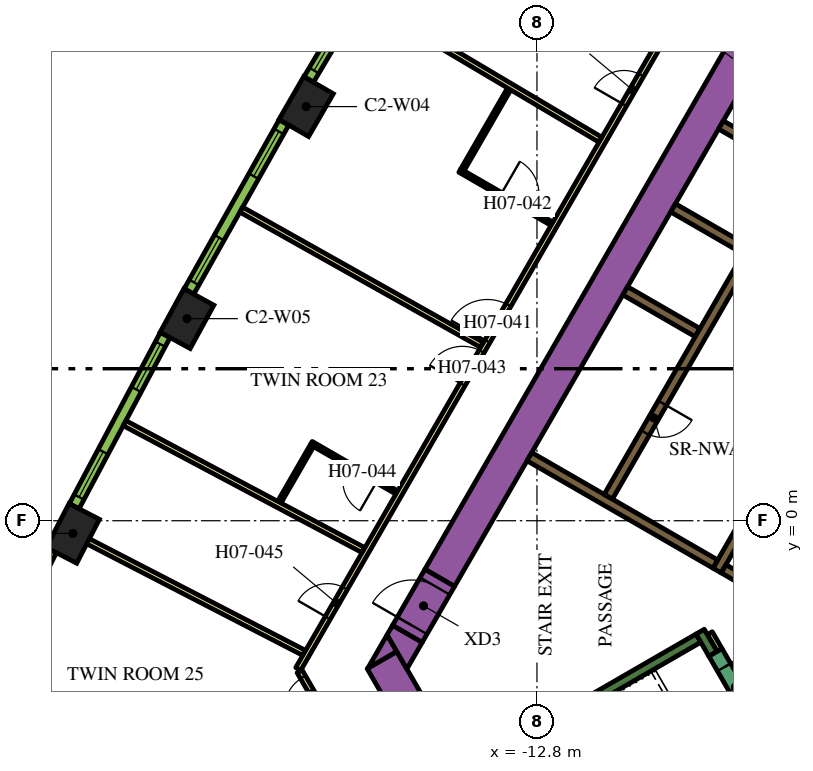
"""IFC4 building model, lengths in metres.
Left out: names, types, materials, properties, quantities, classifications, styles, units other than length and angle.
Written with IfcOpenShell. Run it as: python <this file> out.ifc"""

import sys

from ifc_helpers import new_model, si_unit, direction, frame, frame_2d, origin, origin_2d, place, context, subcontext, project, spatial, polyline, rectangle, outline, extrude, element, fill, save


model = new_model("IFC4")
c1 = context("Model", 3, precision=1e-05, world=origin(), true_north=direction((0.0, 1.0)))
c2 = subcontext(c1, "Body", "Model", "MODEL_VIEW")
j1 = project(units=[si_unit("LENGTHUNIT", "METRE"), si_unit("PLANEANGLEUNIT", "RADIAN")], contexts=[c1])
p1 = place(None, origin())
s1 = spatial("IfcSite", under=j1, at=p1, CompositionType="ELEMENT")
p2 = place(p1, origin())
s2 = spatial("IfcBuilding", under=s1, at=p2, CompositionType="ELEMENT")
p3 = place(p2, frame((0.0, 0.0, 95.4)))
s3 = spatial("IfcBuildingStorey", under=s2, at=p3, CompositionType="ELEMENT", Elevation=95.4)
for number, where, z_axis, x_axis in (
    (1, (-18.874, 10.897, 0.0), (0.0, 0.0, 1.0), (-0.5, -0.866, 0.0)),
    (2, (-22.009, 5.317, 0.0), (0.0, 0.0, 1.0), (-0.48, -0.877, 0.0)),
    (3, (-25.012, -0.334, 0.0), (0.0, 0.0, 1.0), (-0.459, -0.888, 0.0)),
):
    element("IfcColumn", number, at=place(p3, frame(where, z_axis=z_axis, x_axis=x_axis)), inside=s3, PredefinedType="COLUMN", context=c2, shape_type="SweptSolid", body=[
        extrude(rectangle(XDim=1.3, YDim=0.9, at=origin_2d()), origin(), (0.0, 0.0, 1.0), 3.9),
    ])
p4 = place(p3, frame((-15.36, -1.503, 0.0), z_axis=(0.0, 0.0, 1.0), x_axis=(0.50000389221, 0.866023156604, 0.0)))
e4 = element("IfcWall", 4, at=p4, inside=s3, PredefinedType="SOLIDWALL", context=c2, shape_type="SweptSolid", body=[
    extrude(rectangle(XDim=21.0, YDim=0.9, at=frame_2d((10.5, 0.0))), origin(), (0.0, 0.0, 1.0), 3.9),
])
p5 = place(p3, frame((-12.134, -11.883, 0.0), z_axis=(0.0, 0.0, 1.0), x_axis=(-0.500005339912, 0.866022320763, 0.0)))
e5 = element("IfcWall", 5, at=p5, inside=s3, PredefinedType="SOLIDWALL", context=c2, shape_type="SweptSolid", body=[
    extrude(rectangle(XDim=9.488, YDim=0.9, at=frame_2d((4.744, 0.0))), origin(), (0.0, 0.0, 1.0), 3.9),
])
p6 = place(p3, origin())
e6 = element("IfcWall", 6, at=p6, inside=s3, PredefinedType="SOLIDWALL", context=c2, shape_type="SweptSolid", body=[
    extrude(outline(polyline([(-16.489, -3.44), (-17.251, -3.88), (-16.743, -3.0), (-16.489, -3.44)])), origin(), (0.0, 0.0, 1.0), 3.9),
])
e7 = element("IfcWall", 7, at=p6, inside=s3, PredefinedType="SOLIDWALL", context=c2, shape_type="SweptSolid", body=[
    extrude(outline(polyline([(-15.82, -3.201), (-16.223, -3.9), (-16.743, -3.0), (-16.599, -2.751), (-15.82, -3.201)])), origin(), (0.0, 0.0, 1.0), 3.9),
])
p7 = place(p3, frame((-14.44, -6.49, 0.0), z_axis=(0.0, 0.0, 1.0), x_axis=(0.866022966069, 0.500004222222, 0.0)))
e8 = element("IfcWall", 8, at=p7, inside=s3, PredefinedType="SOLIDWALL", context=c2, shape_type="SweptSolid", body=[
    extrude(rectangle(XDim=6.8, YDim=0.25, at=frame_2d((3.4, 0.0))), origin(), (0.0, 0.0, 1.0), 3.9),
])
p8 = place(p3, frame((-8.168, -3.503, 0.0), z_axis=(0.0, 0.0, 1.0), x_axis=(-0.499952099219, 0.866053057547, 0.0)))
e9 = element("IfcWall", 9, at=p8, inside=s3, PredefinedType="SOLIDWALL", context=c2, shape_type="SweptSolid", body=[
    extrude(rectangle(XDim=0.675, YDim=0.25, at=frame_2d((0.337, 0.0))), origin(), (0.0, 0.0, 1.0), 3.9),
])
p9 = place(p3, frame((-8.06, -1.311, 0.0), z_axis=(0.0, 0.0, 1.0), x_axis=(0.50000273126, 0.866023826885, 0.0)))
e10 = element("IfcWall", 10, at=p9, inside=s3, PredefinedType="SOLIDWALL", context=c2, shape_type="SweptSolid", body=[
    extrude(rectangle(XDim=10.33, YDim=0.25, at=frame_2d((5.165, 0.0))), origin(), (0.0, 0.0, 1.0), 3.9),
])
e11 = element("IfcWall", 11, at=p6, inside=s3, PredefinedType="SOLIDWALL", context=c2, shape_type="SweptSolid", body=[
    extrude(outline(polyline([(-5.922, -2.257), (-5.922, -2.257), (-5.705, -2.382), (-5.83, -2.598), (-6.483, -2.221), (-6.591, -2.033), (-6.591, -2.033), (-6.7, -2.096), (-7.952, -1.373), (-7.827, -1.156), (-5.922, -2.257)])), origin(), (0.0, 0.0, 1.0), 3.9),
])
p10 = place(p3, frame((-8.106, -1.14, 0.0), z_axis=(0.0, 0.0, 1.0), x_axis=(-0.866000643155, 0.500042884217, 0.0)))
e12 = element("IfcWall", 12, at=p10, inside=s3, PredefinedType="SOLIDWALL", context=c2, shape_type="SweptSolid", body=[
    extrude(rectangle(XDim=5.65, YDim=0.25, at=frame_2d((2.825, 0.0))), origin(), (0.0, 0.0, 1.0), 3.9),
])
for number, where, z_axis, x_axis in (
    (13, (-8.574, 4.95, 0.0), (0.0, 0.0, 1.0), (-0.866, 0.5, 0.0)),
    (14, (-7.314, 7.132, 0.0), (0.0, 0.0, 1.0), (-0.866, 0.5, 0.0)),
):
    element("IfcWall", number, at=place(p3, frame(where, z_axis=z_axis, x_axis=x_axis)), inside=s3, PredefinedType="SOLIDWALL", context=c2, shape_type="SweptSolid", body=[
        extrude(rectangle(XDim=2.2, YDim=0.25, at=frame_2d((1.1, 0.0))), origin(), (0.0, 0.0, 1.0), 3.9),
    ])
p11 = place(p3, frame((-7.959, 10.415, 0.0), z_axis=(0.0, 0.0, 1.0), x_axis=(0.866020958405, -0.500007699544, 0.0)))
e15 = element("IfcWall", 15, at=p11, inside=s3, PredefinedType="SOLIDWALL", context=c2, shape_type="SweptSolid", body=[
    extrude(rectangle(XDim=4.1, YDim=0.25, at=frame_2d((2.05, 0.0))), origin(), (0.0, 0.0, 1.0), 3.9),
])
p12 = place(p3, frame((-8.252, -2.958, 0.0), z_axis=(0.0, 0.0, 1.0), x_axis=(0.500174715838, -0.865924508047, 0.0)))
e16 = element("IfcWall", 16, at=p12, inside=s3, PredefinedType="PARTITIONING", context=c2, shape_type="SweptSolid", body=[
    extrude(rectangle(XDim=0.514, YDim=0.15, at=frame_2d((0.257, 0.0))), origin(), (0.0, 0.0, 1.0), 2.75),
])
p13 = place(p3, frame((-6.008, 9.144, 0.0), z_axis=(0.0, 0.0, 1.0), x_axis=(-0.500006956611, -0.866021387346, 0.0)))
e17 = element("IfcWall", 17, at=p13, inside=s3, PredefinedType="SOLIDWALL", context=c2, shape_type="SweptSolid", body=[
    extrude(rectangle(XDim=9.83, YDim=0.25, at=frame_2d((4.915, 0.0))), origin(), (0.0, 0.0, 1.0), 3.9),
])
p14 = place(p13, frame((6.985, 0.0, 0.0)))
e18 = element("IfcOpeningElement", 18, at=p14, cuts=e17, PredefinedType="OPENING", context=c2, shape_type="SweptSolid", body=[
    extrude(rectangle(XDim=0.9, YDim=2.1, at=frame_2d((0.45, 1.05))), frame((0.0, 0.135, 0.0), z_axis=(0.0, -1.0, 0.0), x_axis=(1.0, 0.0, 0.0)), (0.0, 0.0, 1.0), 0.27),
])
p15 = place(p3, frame((-8.103, -3.466, 0.0), z_axis=(0.0, 0.0, 1.0), x_axis=(0.500078061341, -0.865980330357, 0.0)))
e19 = element("IfcWall", 19, at=p15, inside=s3, PredefinedType="SOLIDWALL", context=c2, shape_type="SweptSolid", body=[
    extrude(rectangle(XDim=2.1, YDim=0.4, at=frame_2d((1.05, 0.0))), origin(), (0.0, 0.0, 1.0), 3.9),
])
p16 = place(p15, frame((0.45, 0.0, 0.0)))
e20 = element("IfcOpeningElement", 20, at=p16, cuts=e19, PredefinedType="OPENING", context=c2, shape_type="SweptSolid", body=[
    extrude(rectangle(XDim=1.2, YDim=2.1, at=frame_2d((0.6, 1.05))), frame((0.0, 0.21, 0.0), z_axis=(0.0, -1.0, 0.0), x_axis=(1.0, 0.0, 0.0)), (0.0, 0.0, 1.0), 0.42),
])
p17 = place(p3, frame((-16.209, -2.976, 0.0), z_axis=(0.0, 0.0, 1.0), x_axis=(0.499954529098, 0.86605165483, 0.0)))
e21 = element("IfcWall", 21, at=p17, inside=s3, PredefinedType="SOLIDWALL", context=c2, shape_type="SweptSolid", body=[
    extrude(rectangle(XDim=1.7, YDim=0.9, at=frame_2d((0.85, 0.0))), origin(), (0.0, 0.0, 1.0), 3.9),
])
p18 = place(p17, frame((0.25, 0.0, 0.0)))
e22 = element("IfcOpeningElement", 22, at=p18, cuts=e21, PredefinedType="OPENING", context=c2, shape_type="SweptSolid", body=[
    extrude(rectangle(XDim=1.2, YDim=2.1, at=frame_2d((0.6, 1.05))), frame((0.0, 0.46, 0.0), z_axis=(0.0, -1.0, 0.0), x_axis=(1.0, 0.0, 0.0)), (0.0, 0.0, 1.0), 0.92),
])
p19 = place(p3, frame((-19.081, -3.9, 0.0), z_axis=(0.0, 0.0, 1.0), x_axis=(0.499998313975, 0.866026377209, 0.0)))
e23 = element("IfcWall", 23, at=p19, inside=s3, PredefinedType="PARTITIONING", context=c2, shape_type="SweptSolid", body=[
    extrude(rectangle(XDim=25.766, YDim=0.15, at=frame_2d((12.883, 0.0))), origin(), (0.0, 0.0, 1.0), 2.75),
])
p20 = place(p19, frame((19.306, 0.0, 0.0)))
e24 = element("IfcOpeningElement", 24, at=p20, cuts=e23, PredefinedType="OPENING", context=c2, shape_type="SweptSolid", body=[
    extrude(rectangle(XDim=1.0, YDim=2.1, at=frame_2d((0.5, 1.05))), frame((0.0, 0.085, 0.0), z_axis=(0.0, -1.0, 0.0), x_axis=(1.0, 0.0, 0.0)), (0.0, 0.0, 1.0), 0.17),
])
p21 = place(p19, frame((17.144, 0.0, 0.0)))
e25 = element("IfcOpeningElement", 25, at=p21, cuts=e23, PredefinedType="OPENING", context=c2, shape_type="SweptSolid", body=[
    extrude(rectangle(XDim=0.9, YDim=2.1, at=frame_2d((0.45, 1.05))), frame((0.0, 0.085, 0.0), z_axis=(0.0, -1.0, 0.0), x_axis=(1.0, 0.0, 0.0)), (0.0, 0.0, 1.0), 0.17),
])
p22 = place(p19, frame((9.955, 0.0, 0.0)))
e26 = element("IfcOpeningElement", 26, at=p22, cuts=e23, PredefinedType="OPENING", context=c2, shape_type="SweptSolid", body=[
    extrude(rectangle(XDim=1.1, YDim=2.1, at=frame_2d((0.55, 1.05))), frame((0.0, 0.085, 0.0), z_axis=(0.0, -1.0, 0.0), x_axis=(1.0, 0.0, 0.0)), (0.0, 0.0, 1.0), 0.17),
])
p23 = place(p19, frame((8.648, 0.0, 0.0)))
e27 = element("IfcOpeningElement", 27, at=p23, cuts=e23, PredefinedType="OPENING", context=c2, shape_type="SweptSolid", body=[
    extrude(rectangle(XDim=1.0, YDim=2.1, at=frame_2d((0.5, 1.05))), frame((0.0, 0.085, 0.0), z_axis=(0.0, -1.0, 0.0), x_axis=(1.0, 0.0, 0.0)), (0.0, 0.0, 1.0), 0.17),
])
p24 = place(p19, frame((1.553, 0.0, 0.0)))
e28 = element("IfcOpeningElement", 28, at=p24, cuts=e23, PredefinedType="OPENING", context=c2, shape_type="SweptSolid", body=[
    extrude(rectangle(XDim=0.9, YDim=2.1, at=frame_2d((0.45, 1.05))), frame((0.0, 0.085, 0.0), z_axis=(0.0, -1.0, 0.0), x_axis=(1.0, 0.0, 0.0)), (0.0, 0.0, 1.0), 0.17),
])
p25 = place(p3, frame((-16.412, -8.523, 0.0), z_axis=(0.0, 0.0, 1.0), x_axis=(-0.500001929737, 0.866024289647, 0.0)))
e29 = element("IfcWall", 29, at=p25, inside=s3, PredefinedType="PARTITIONING", context=c2, shape_type="SweptSolid", body=[
    extrude(rectangle(XDim=5.268, YDim=0.15, at=frame_2d((2.634, 0.0))), origin(), (0.0, 0.0, 1.0), 2.75),
])
p26 = place(p25, frame((4.088, 0.0, 0.0)))
e30 = element("IfcOpeningElement", 30, at=p26, cuts=e29, PredefinedType="OPENING", context=c2, shape_type="SweptSolid", body=[
    extrude(rectangle(XDim=1.0, YDim=2.1, at=frame_2d((0.5, 1.05))), frame((0.0, 0.085, 0.0), z_axis=(0.0, -1.0, 0.0), x_axis=(1.0, 0.0, 0.0)), (0.0, 0.0, 1.0), 0.17),
])
p27 = place(p3, frame((-24.613, -0.541, 0.0), z_axis=(0.0, 0.0, 1.0), x_axis=(0.888459912519, -0.458954228487, 0.0)))
e31 = element("IfcWall", 31, at=p27, inside=s3, PredefinedType="PARTITIONING", context=c2, shape_type="SweptSolid", body=[
    extrude(rectangle(XDim=6.392, YDim=0.15, at=frame_2d((3.196, 0.0))), origin(), (0.0, 0.0, 1.0), 2.75),
])
p28 = place(p3, frame((-23.652, 2.567, 0.0), z_axis=(0.0, 0.0, 1.0), x_axis=(0.883019237957, -0.469336793144, 0.0)))
e32 = element("IfcWall", 32, at=p28, inside=s3, PredefinedType="PARTITIONING", context=c2, shape_type="SweptSolid", body=[
    extrude(rectangle(XDim=7.111, YDim=0.15, at=frame_2d((3.555, 0.0))), origin(), (0.0, 0.0, 1.0), 2.75),
])
for number, where, z_axis, x_axis in (
    (33, (-20.581, 8.185, 0.0), (0.0, 0.0, 1.0), (0.872, -0.49, 0.0)),
    (34, (-17.379, 13.731, 0.0), (0.0, 0.0, 1.0), (0.86, -0.51, 0.0)),
):
    element("IfcWall", number, at=place(p3, frame(where, z_axis=z_axis, x_axis=x_axis)), inside=s3, PredefinedType="PARTITIONING", context=c2, shape_type="SweptSolid", body=[
        extrude(rectangle(XDim=7.257, YDim=0.15, at=frame_2d((3.628, 0.0))), origin(), (0.0, 0.0, 1.0), 2.75),
    ])
p29 = place(p3, frame((-14.83, 9.213, 0.0), z_axis=(0.0, 0.0, 1.0), x_axis=(0.866034573852, -0.49998411664, 0.0)))
e35 = element("IfcWall", 35, at=p29, inside=s3, PredefinedType="PARTITIONING", context=c2, shape_type="SweptSolid", body=[
    extrude(rectangle(XDim=2.8, YDim=0.1, at=frame_2d((1.4, 0.0))), origin(), (0.0, 0.0, 1.0), 2.75),
])
p30 = place(p29, frame((1.25, 0.0, 0.0)))
e36 = element("IfcOpeningElement", 36, at=p30, cuts=e35, PredefinedType="OPENING", context=c2, shape_type="SweptSolid", body=[
    extrude(rectangle(XDim=1.0, YDim=2.1, at=frame_2d((0.5, 1.05))), frame((0.0, 0.06, 0.0), z_axis=(0.0, -1.0, 0.0), x_axis=(1.0, 0.0, 0.0)), (0.0, 0.0, 1.0), 0.12),
])
p31 = place(p3, frame((-14.762, 9.231, 0.0), z_axis=(0.0, 0.0, 1.0), x_axis=(0.500003092839, 0.866023618125, 0.0)))
e37 = element("IfcWall", 37, at=p31, inside=s3, PredefinedType="PARTITIONING", context=c2, shape_type="SweptSolid", body=[
    extrude(rectangle(XDim=2.46, YDim=0.1, at=frame_2d((1.23, 0.0))), origin(), (0.0, 0.0, 1.0), 2.75),
])
p32 = place(p3, frame((-16.487, 0.743, 0.0), z_axis=(0.0, 0.0, 1.0), x_axis=(-0.866021400173, 0.500006934395, 0.0)))
e38 = element("IfcWall", 38, at=p32, inside=s3, PredefinedType="PARTITIONING", context=c2, shape_type="SweptSolid", body=[
    extrude(rectangle(XDim=2.6, YDim=0.1, at=frame_2d((1.3, 0.0))), origin(), (0.0, 0.0, 1.0), 2.75),
])
p33 = place(p32, frame((0.6, 0.0, 0.0)))
e39 = element("IfcOpeningElement", 39, at=p33, cuts=e38, PredefinedType="OPENING", context=c2, shape_type="SweptSolid", body=[
    extrude(rectangle(XDim=0.9, YDim=2.1, at=frame_2d((0.45, 1.05))), frame((0.0, 0.06, 0.0), z_axis=(0.0, -1.0, 0.0), x_axis=(1.0, 0.0, 0.0)), (0.0, 0.0, 1.0), 0.12),
])
p34 = place(p3, frame((-18.726, 1.966, 0.0), z_axis=(0.0, 0.0, 1.0), x_axis=(-0.499954529098, -0.86605165483, 0.0)))
e40 = element("IfcWall", 40, at=p34, inside=s3, PredefinedType="PARTITIONING", context=c2, shape_type="SweptSolid", body=[
    extrude(rectangle(XDim=1.7, YDim=0.1, at=frame_2d((0.85, 0.0))), origin(), (0.0, 0.0, 1.0), 2.75),
])
p35 = place(p3, frame((-16.203, 15.998, 0.0), z_axis=(0.0, 0.0, 1.0), x_axis=(-0.510054281659, -0.860142214847, 0.0)))
e41 = element("IfcWall", 41, at=p35, inside=s3, PredefinedType="SOLIDWALL", context=c2, shape_type="SweptSolid", body=[
    extrude(rectangle(XDim=5.101, YDim=0.29, at=frame_2d((2.55, 0.0))), origin(), (0.0, 0.0, 1.0), 3.65),
])
p36 = place(p35, frame((0.273, 0.0, 0.9)))
e42 = element("IfcOpeningElement", 42, at=p36, cuts=e41, PredefinedType="OPENING", context=c2, shape_type="SweptSolid", body=[
    extrude(rectangle(XDim=1.35, YDim=2.15, at=frame_2d((0.675, 1.075))), frame((0.0, 0.155, 0.0), z_axis=(0.0, -1.0, 0.0), x_axis=(1.0, 0.0, 0.0)), (0.0, 0.0, 1.0), 0.31),
])
p37 = place(p35, frame((3.478, 0.0, 0.9)))
e43 = element("IfcOpeningElement", 43, at=p37, cuts=e41, PredefinedType="OPENING", context=c2, shape_type="SweptSolid", body=[
    extrude(rectangle(XDim=1.35, YDim=2.15, at=frame_2d((0.675, 1.075))), frame((0.0, 0.155, 0.0), z_axis=(0.0, -1.0, 0.0), x_axis=(1.0, 0.0, 0.0)), (0.0, 0.0, 1.0), 0.31),
])
p38 = place(p3, frame((-19.458, 10.48, 0.0), z_axis=(0.0, 0.0, 1.0), x_axis=(-0.48983164787, -0.87181704316, 0.0)))
e44 = element("IfcWall", 44, at=p38, inside=s3, PredefinedType="SOLIDWALL", context=c2, shape_type="SweptSolid", body=[
    extrude(rectangle(XDim=5.1, YDim=0.29, at=frame_2d((2.55, 0.0))), origin(), (0.0, 0.0, 1.0), 3.65),
])
p39 = place(p38, frame((0.272, 0.0, 0.9)))
e45 = element("IfcOpeningElement", 45, at=p39, cuts=e44, PredefinedType="OPENING", context=c2, shape_type="SweptSolid", body=[
    extrude(rectangle(XDim=1.35, YDim=2.15, at=frame_2d((0.675, 1.075))), frame((0.0, 0.155, 0.0), z_axis=(0.0, -1.0, 0.0), x_axis=(1.0, 0.0, 0.0)), (0.0, 0.0, 1.0), 0.31),
])
p40 = place(p38, frame((3.478, 0.0, 0.9)))
e46 = element("IfcOpeningElement", 46, at=p40, cuts=e44, PredefinedType="OPENING", context=c2, shape_type="SweptSolid", body=[
    extrude(rectangle(XDim=1.35, YDim=2.15, at=frame_2d((0.675, 1.075))), frame((0.0, 0.155, 0.0), z_axis=(0.0, -1.0, 0.0), x_axis=(1.0, 0.0, 0.0)), (0.0, 0.0, 1.0), 0.31),
])
p41 = place(p3, frame((-22.583, 4.887, 0.0), z_axis=(0.0, 0.0, 1.0), x_axis=(-0.469323203119, -0.883026461106, 0.0)))
e47 = element("IfcWall", 47, at=p41, inside=s3, PredefinedType="SOLIDWALL", context=c2, shape_type="SweptSolid", body=[
    extrude(rectangle(XDim=5.101, YDim=0.29, at=frame_2d((2.55, 0.0))), origin(), (0.0, 0.0, 1.0), 3.65),
])
p42 = place(p41, frame((0.273, 0.0, 0.9)))
e48 = element("IfcOpeningElement", 48, at=p42, cuts=e47, PredefinedType="OPENING", context=c2, shape_type="SweptSolid", body=[
    extrude(rectangle(XDim=1.35, YDim=2.15, at=frame_2d((0.675, 1.075))), frame((0.0, 0.155, 0.0), z_axis=(0.0, -1.0, 0.0), x_axis=(1.0, 0.0, 0.0)), (0.0, 0.0, 1.0), 0.31),
])
p43 = place(p41, frame((3.478, 0.0, 0.9)))
e49 = element("IfcOpeningElement", 49, at=p43, cuts=e47, PredefinedType="OPENING", context=c2, shape_type="SweptSolid", body=[
    extrude(rectangle(XDim=1.35, YDim=2.15, at=frame_2d((0.675, 1.075))), frame((0.0, 0.155, 0.0), z_axis=(0.0, -1.0, 0.0), x_axis=(1.0, 0.0, 0.0)), (0.0, 0.0, 1.0), 0.31),
])
p44 = place(p3, frame((-25.576, -0.778, 0.0), z_axis=(0.0, 0.0, 1.0), x_axis=(-0.448534297211, -0.893765620409, 0.0)))
e50 = element("IfcWall", 50, at=p44, inside=s3, PredefinedType="SOLIDWALL", context=c2, shape_type="SweptSolid", body=[
    extrude(rectangle(XDim=5.1, YDim=0.29, at=frame_2d((2.55, 0.0))), origin(), (0.0, 0.0, 1.0), 3.65),
])
p45 = place(p44, frame((0.272, 0.0, 0.9)))
e51 = element("IfcOpeningElement", 51, at=p45, cuts=e50, PredefinedType="OPENING", context=c2, shape_type="SweptSolid", body=[
    extrude(rectangle(XDim=1.35, YDim=2.15, at=frame_2d((0.675, 1.075))), frame((0.0, 0.155, 0.0), z_axis=(0.0, -1.0, 0.0), x_axis=(1.0, 0.0, 0.0)), (0.0, 0.0, 1.0), 0.31),
])
p46 = place(p44, frame((3.478, 0.0, 0.9)))
e52 = element("IfcOpeningElement", 52, at=p46, cuts=e50, PredefinedType="OPENING", context=c2, shape_type="SweptSolid", body=[
    extrude(rectangle(XDim=1.35, YDim=2.15, at=frame_2d((0.675, 1.075))), frame((0.0, 0.155, 0.0), z_axis=(0.0, -1.0, 0.0), x_axis=(1.0, 0.0, 0.0)), (0.0, 0.0, 1.0), 0.31),
])
p47 = place(p14, origin())
e53 = element("IfcDoor", 53, at=p47, inside=s3, OperationType="SINGLE_SWING_LEFT", PredefinedType="DOOR", context=c2, shape_type="SweptSolid", body=[
    extrude(rectangle(XDim=0.9, YDim=2.1, at=frame_2d((0.45, 1.05))), frame((0.0, 0.025, 0.0), z_axis=(0.0, -1.0, 0.0), x_axis=(1.0, 0.0, 0.0)), (0.0, 0.0, 1.0), 0.05),
])
fill(e18, e53)
p48 = place(p16, origin())
e54 = element("IfcDoor", 54, at=p48, inside=s3, OperationType="SINGLE_SWING_LEFT", PredefinedType="DOOR", context=c2, shape_type="SweptSolid", body=[
    extrude(rectangle(XDim=1.2, YDim=2.1, at=frame_2d((0.6, 1.05))), frame((0.0, 0.025, 0.0), z_axis=(0.0, -1.0, 0.0), x_axis=(1.0, 0.0, 0.0)), (0.0, 0.0, 1.0), 0.05),
])
fill(e20, e54)
p49 = place(p18, origin())
e55 = element("IfcDoor", 55, at=p49, inside=s3, OperationType="SINGLE_SWING_LEFT", PredefinedType="DOOR", context=c2, shape_type="SweptSolid", body=[
    extrude(rectangle(XDim=1.2, YDim=2.1, at=frame_2d((0.6, 1.05))), frame((0.0, 0.025, 0.0), z_axis=(0.0, -1.0, 0.0), x_axis=(1.0, 0.0, 0.0)), (0.0, 0.0, 1.0), 0.05),
])
fill(e22, e55)
p50 = place(p21, origin())
e56 = element("IfcDoor", 56, at=p50, inside=s3, OperationType="SINGLE_SWING_LEFT", PredefinedType="DOOR", context=c2, shape_type="SweptSolid", body=[
    extrude(rectangle(XDim=0.9, YDim=2.1, at=frame_2d((0.45, 1.05))), frame((0.0, 0.025, 0.0), z_axis=(0.0, -1.0, 0.0), x_axis=(1.0, 0.0, 0.0)), (0.0, 0.0, 1.0), 0.05),
])
fill(e25, e56)
p51 = place(p22, origin())
e57 = element("IfcDoor", 57, at=p51, inside=s3, OperationType="SINGLE_SWING_LEFT", PredefinedType="DOOR", context=c2, shape_type="SweptSolid", body=[
    extrude(rectangle(XDim=1.1, YDim=2.1, at=frame_2d((0.55, 1.05))), frame((0.0, 0.025, 0.0), z_axis=(0.0, -1.0, 0.0), x_axis=(1.0, 0.0, 0.0)), (0.0, 0.0, 1.0), 0.05),
])
fill(e26, e57)
p52 = place(p30, origin())
e58 = element("IfcDoor", 58, at=p52, inside=s3, OperationType="SINGLE_SWING_LEFT", PredefinedType="DOOR", context=c2, shape_type="SweptSolid", body=[
    extrude(rectangle(XDim=1.0, YDim=2.1, at=frame_2d((0.5, 1.05))), frame((0.0, 0.025, 0.0), z_axis=(0.0, -1.0, 0.0), x_axis=(1.0, 0.0, 0.0)), (0.0, 0.0, 1.0), 0.05),
])
fill(e36, e58)
p53 = place(p23, origin())
e59 = element("IfcDoor", 59, at=p53, inside=s3, OperationType="SINGLE_SWING_RIGHT", PredefinedType="DOOR", context=c2, shape_type="SweptSolid", body=[
    extrude(rectangle(XDim=1.0, YDim=2.1, at=frame_2d((0.5, 1.05))), frame((0.0, 0.025, 0.0), z_axis=(0.0, -1.0, 0.0), x_axis=(1.0, 0.0, 0.0)), (0.0, 0.0, 1.0), 0.05),
])
fill(e27, e59)
p54 = place(p33, origin())
e60 = element("IfcDoor", 60, at=p54, inside=s3, OperationType="SINGLE_SWING_LEFT", PredefinedType="DOOR", context=c2, shape_type="SweptSolid", body=[
    extrude(rectangle(XDim=0.9, YDim=2.1, at=frame_2d((0.45, 1.05))), frame((0.0, 0.025, 0.0), z_axis=(0.0, -1.0, 0.0), x_axis=(1.0, 0.0, 0.0)), (0.0, 0.0, 1.0), 0.05),
])
fill(e39, e60)
p55 = place(p24, origin())
e61 = element("IfcDoor", 61, at=p55, inside=s3, OperationType="SINGLE_SWING_RIGHT", PredefinedType="DOOR", context=c2, shape_type="SweptSolid", body=[
    extrude(rectangle(XDim=0.9, YDim=2.1, at=frame_2d((0.45, 1.05))), frame((0.0, 0.025, 0.0), z_axis=(0.0, -1.0, 0.0), x_axis=(1.0, 0.0, 0.0)), (0.0, 0.0, 1.0), 0.05),
])
fill(e28, e61)
p56 = place(p26, origin())
e62 = element("IfcDoor", 62, at=p56, inside=s3, OperationType="SINGLE_SWING_RIGHT", PredefinedType="DOOR", context=c2, shape_type="SweptSolid", body=[
    extrude(rectangle(XDim=1.0, YDim=2.1, at=frame_2d((0.5, 1.05))), frame((0.0, 0.025, 0.0), z_axis=(0.0, -1.0, 0.0), x_axis=(1.0, 0.0, 0.0)), (0.0, 0.0, 1.0), 0.05),
])
fill(e30, e62)
p57 = place(p37, origin())
e63 = element("IfcWindow", 63, at=p57, inside=s3, PartitioningType="DOUBLE_PANEL_VERTICAL", PredefinedType="WINDOW", context=c2, shape_type="SweptSolid", body=[
    extrude(rectangle(XDim=1.35, YDim=2.15, at=frame_2d((0.675, 1.075))), frame((0.0, 0.015, 0.0), z_axis=(0.0, -1.0, 0.0), x_axis=(1.0, 0.0, 0.0)), (0.0, 0.0, 1.0), 0.06),
])
fill(e43, e63)
p58 = place(p39, origin())
e64 = element("IfcWindow", 64, at=p58, inside=s3, PartitioningType="DOUBLE_PANEL_VERTICAL", PredefinedType="WINDOW", context=c2, shape_type="SweptSolid", body=[
    extrude(rectangle(XDim=1.35, YDim=2.15, at=frame_2d((0.675, 1.075))), frame((0.0, 0.015, 0.0), z_axis=(0.0, -1.0, 0.0), x_axis=(1.0, 0.0, 0.0)), (0.0, 0.0, 1.0), 0.06),
])
fill(e45, e64)
p59 = place(p40, origin())
e65 = element("IfcWindow", 65, at=p59, inside=s3, PartitioningType="DOUBLE_PANEL_VERTICAL", PredefinedType="WINDOW", context=c2, shape_type="SweptSolid", body=[
    extrude(rectangle(XDim=1.35, YDim=2.15, at=frame_2d((0.675, 1.075))), frame((0.0, 0.015, 0.0), z_axis=(0.0, -1.0, 0.0), x_axis=(1.0, 0.0, 0.0)), (0.0, 0.0, 1.0), 0.06),
])
fill(e46, e65)
p60 = place(p42, origin())
e66 = element("IfcWindow", 66, at=p60, inside=s3, PartitioningType="DOUBLE_PANEL_VERTICAL", PredefinedType="WINDOW", context=c2, shape_type="SweptSolid", body=[
    extrude(rectangle(XDim=1.35, YDim=2.15, at=frame_2d((0.675, 1.075))), frame((0.0, 0.015, 0.0), z_axis=(0.0, -1.0, 0.0), x_axis=(1.0, 0.0, 0.0)), (0.0, 0.0, 1.0), 0.06),
])
fill(e48, e66)
p61 = place(p43, origin())
e67 = element("IfcWindow", 67, at=p61, inside=s3, PartitioningType="DOUBLE_PANEL_VERTICAL", PredefinedType="WINDOW", context=c2, shape_type="SweptSolid", body=[
    extrude(rectangle(XDim=1.35, YDim=2.15, at=frame_2d((0.675, 1.075))), frame((0.0, 0.015, 0.0), z_axis=(0.0, -1.0, 0.0), x_axis=(1.0, 0.0, 0.0)), (0.0, 0.0, 1.0), 0.06),
])
fill(e49, e67)
save(model, sys.argv[1])
